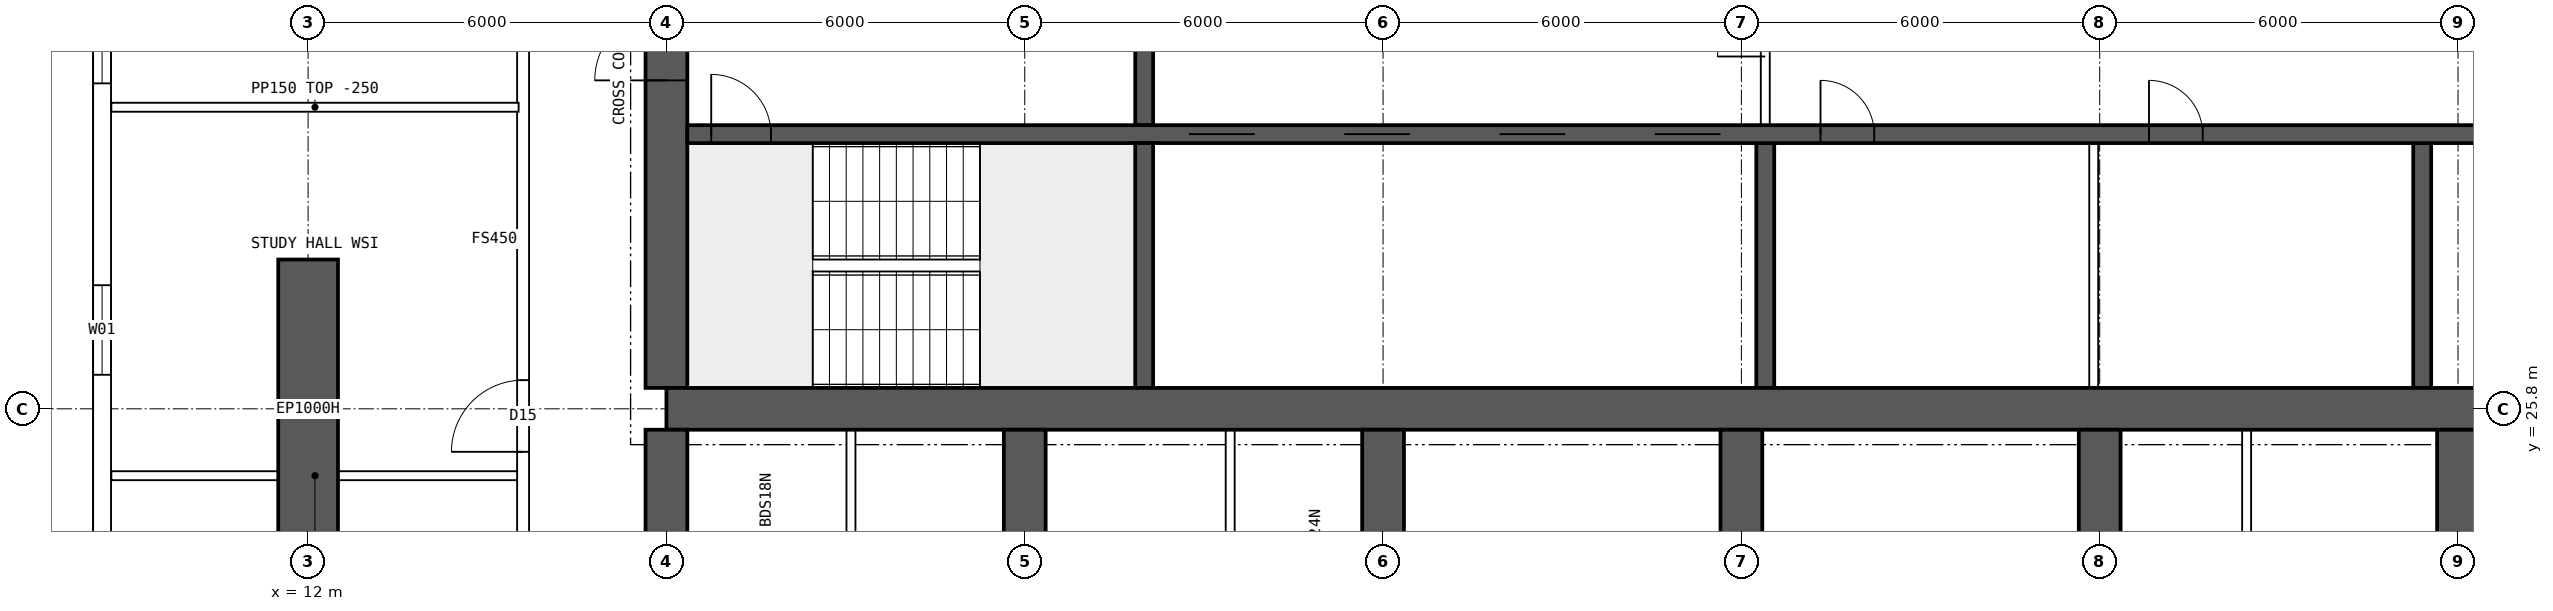
"""IFC4 building model, lengths in metres.
Left out: names, types, materials, properties, quantities, classifications, styles, units other than length and angle.
Written with IfcOpenShell. Run it as: python <this file> out.ifc"""

import sys

from ifc_helpers import new_model, si_unit, direction, frame, frame_2d, origin, place, context, subcontext, project, spatial, polyline, rectangle, outline, extrude, element, fill, save


model = new_model("IFC4")
c1 = context("Model", 3, precision=1e-05, world=origin(), true_north=direction((0.0, 1.0)))
c2 = subcontext(c1, "Body", "Model", "MODEL_VIEW")
j1 = project(units=[si_unit("LENGTHUNIT", "METRE"), si_unit("PLANEANGLEUNIT", "RADIAN")], contexts=[c1])
p1 = place(None, origin())
s1 = spatial("IfcSite", under=j1, at=p1, CompositionType="ELEMENT")
p2 = place(p1, origin())
s2 = spatial("IfcBuilding", under=s1, at=p2, CompositionType="ELEMENT")
p3 = place(p2, frame((0.0, 0.0, 216.55)))
s3 = spatial("IfcBuildingStorey", under=s2, at=p3, CompositionType="ELEMENT", Elevation=216.55)
p4 = place(p3, frame((12.0, 23.3, 0.0), z_axis=(0.0, 0.0, 1.0), x_axis=(0.0, 1.0, 0.0)))
e1 = element("IfcWall", 1, at=p4, inside=s3, PredefinedType="SHEAR", context=c2, shape_type="SweptSolid", body=[
    extrude(rectangle(XDim=5.0, YDim=1.0, at=frame_2d((2.5, 0.0))), origin(), (0.0, 0.0, 1.0), 3.75),
])
p5 = place(p3, frame((18.0, 25.8, 0.0), z_axis=(0.0, 0.0, 1.0), x_axis=(1.0, 0.0, 0.0)))
e2 = element("IfcWall", 2, at=p5, inside=s3, PredefinedType="SHEAR", context=c2, shape_type="SweptSolid", body=[
    extrude(rectangle(XDim=48.0, YDim=0.7, at=frame_2d((24.0, 0.0))), origin(), (0.0, 0.0, 1.0), 3.75),
])
p6 = place(p3, frame((18.0, 26.15, 0.0), z_axis=(0.0, 0.0, 1.0), x_axis=(0.0, 1.0, 0.0)))
e3 = element("IfcWall", 3, at=p6, inside=s3, PredefinedType="SHEAR", context=c2, shape_type="SweptSolid", body=[
    extrude(rectangle(XDim=11.7, YDim=0.7, at=frame_2d((5.85, 0.0))), origin(), (0.0, 0.0, 1.0), 3.75),
])
p7 = place(p6, frame((5.15, 0.0, 0.0)))
e4 = element("IfcOpeningElement", 4, at=p7, cuts=e3, PredefinedType="OPENING", context=c2, shape_type="SweptSolid", body=[
    extrude(rectangle(XDim=1.2, YDim=2.1, at=frame_2d((0.6, 1.05))), frame((0.0, 0.36, 0.0), z_axis=(0.0, -1.0, 0.0), x_axis=(1.0, 0.0, 0.0)), (0.0, 0.0, 1.0), 0.72),
])
p8 = place(p3, frame((18.35, 30.4, 0.0), z_axis=(0.0, 0.0, 1.0), x_axis=(1.0, 0.0, 0.0)))
e5 = element("IfcWall", 5, at=p8, inside=s3, PredefinedType="SHEAR", context=c2, shape_type="SweptSolid", body=[
    extrude(rectangle(XDim=47.3, YDim=0.3, at=frame_2d((23.65, 0.0))), origin(), (0.0, 0.0, 1.0), 3.75),
])
p9 = place(p8, frame((0.4, 0.0, 0.0)))
e6 = element("IfcOpeningElement", 6, at=p9, cuts=e5, PredefinedType="OPENING", context=c2, shape_type="SweptSolid", body=[
    extrude(rectangle(XDim=1.0, YDim=2.1, at=frame_2d((0.5, 1.05))), frame((0.0, 0.16, 0.0), z_axis=(0.0, -1.0, 0.0), x_axis=(1.0, 0.0, 0.0)), (0.0, 0.0, 1.0), 0.32),
])
p10 = place(p8, frame((45.9, 0.0, 0.0)))
e7 = element("IfcOpeningElement", 7, at=p10, cuts=e5, PredefinedType="OPENING", context=c2, shape_type="SweptSolid", body=[
    extrude(rectangle(XDim=1.0, YDim=2.1, at=frame_2d((0.5, 1.05))), frame((0.0, 0.16, 0.0), z_axis=(0.0, -1.0, 0.0), x_axis=(1.0, 0.0, 0.0)), (0.0, 0.0, 1.0), 0.32),
])
p11 = place(p8, frame((8.4, 0.0, 0.0)))
e8 = element("IfcOpeningElement", 8, at=p11, cuts=e5, PredefinedType="OPENING", context=c2, shape_type="SweptSolid", body=[
    extrude(rectangle(XDim=1.1, YDim=2.1, at=frame_2d((0.55, 1.05))), frame((0.0, 0.16, 0.0), z_axis=(0.0, -1.0, 0.0), x_axis=(1.0, 0.0, 0.0)), (0.0, 0.0, 1.0), 0.32),
])
p12 = place(p8, frame((11.0, 0.0, 0.0)))
e9 = element("IfcOpeningElement", 9, at=p12, cuts=e5, PredefinedType="OPENING", context=c2, shape_type="SweptSolid", body=[
    extrude(rectangle(XDim=1.1, YDim=2.1, at=frame_2d((0.55, 1.05))), frame((0.0, 0.16, 0.0), z_axis=(0.0, -1.0, 0.0), x_axis=(1.0, 0.0, 0.0)), (0.0, 0.0, 1.0), 0.32),
])
p13 = place(p8, frame((13.6, 0.0, 0.0)))
e10 = element("IfcOpeningElement", 10, at=p13, cuts=e5, PredefinedType="OPENING", context=c2, shape_type="SweptSolid", body=[
    extrude(rectangle(XDim=1.1, YDim=2.1, at=frame_2d((0.55, 1.05))), frame((0.0, 0.16, 0.0), z_axis=(0.0, -1.0, 0.0), x_axis=(1.0, 0.0, 0.0)), (0.0, 0.0, 1.0), 0.32),
])
p14 = place(p8, frame((16.2, 0.0, 0.0)))
e11 = element("IfcOpeningElement", 11, at=p14, cuts=e5, PredefinedType="OPENING", context=c2, shape_type="SweptSolid", body=[
    extrude(rectangle(XDim=1.1, YDim=2.1, at=frame_2d((0.55, 1.05))), frame((0.0, 0.16, 0.0), z_axis=(0.0, -1.0, 0.0), x_axis=(1.0, 0.0, 0.0)), (0.0, 0.0, 1.0), 0.32),
])
p15 = place(p8, frame((18.975, 0.0, 0.0)))
e12 = element("IfcOpeningElement", 12, at=p15, cuts=e5, PredefinedType="OPENING", context=c2, shape_type="SweptSolid", body=[
    extrude(rectangle(XDim=0.9, YDim=2.1, at=frame_2d((0.45, 1.05))), frame((0.0, 0.16, 0.0), z_axis=(0.0, -1.0, 0.0), x_axis=(1.0, 0.0, 0.0)), (0.0, 0.0, 1.0), 0.32),
])
p16 = place(p8, frame((24.475, 0.0, 0.0)))
e13 = element("IfcOpeningElement", 13, at=p16, cuts=e5, PredefinedType="OPENING", context=c2, shape_type="SweptSolid", body=[
    extrude(rectangle(XDim=0.9, YDim=2.1, at=frame_2d((0.45, 1.05))), frame((0.0, 0.16, 0.0), z_axis=(0.0, -1.0, 0.0), x_axis=(1.0, 0.0, 0.0)), (0.0, 0.0, 1.0), 0.32),
])
p17 = place(p8, frame((30.267, 0.0, 0.0)))
e14 = element("IfcOpeningElement", 14, at=p17, cuts=e5, PredefinedType="OPENING", context=c2, shape_type="SweptSolid", body=[
    extrude(rectangle(XDim=1.1, YDim=2.1, at=frame_2d((0.55, 1.05))), frame((0.0, 0.16, 0.0), z_axis=(0.0, -1.0, 0.0), x_axis=(1.0, 0.0, 0.0)), (0.0, 0.0, 1.0), 0.32),
])
p18 = place(p8, frame((33.8, 0.0, 0.0)))
e15 = element("IfcOpeningElement", 15, at=p18, cuts=e5, PredefinedType="OPENING", context=c2, shape_type="SweptSolid", body=[
    extrude(rectangle(XDim=1.1, YDim=2.1, at=frame_2d((0.55, 1.05))), frame((0.0, 0.16, 0.0), z_axis=(0.0, -1.0, 0.0), x_axis=(1.0, 0.0, 0.0)), (0.0, 0.0, 1.0), 0.32),
])
p19 = place(p8, frame((37.333, 0.0, 0.0)))
e16 = element("IfcOpeningElement", 16, at=p19, cuts=e5, PredefinedType="OPENING", context=c2, shape_type="SweptSolid", body=[
    extrude(rectangle(XDim=1.1, YDim=2.1, at=frame_2d((0.55, 1.05))), frame((0.0, 0.16, 0.0), z_axis=(0.0, -1.0, 0.0), x_axis=(1.0, 0.0, 0.0)), (0.0, 0.0, 1.0), 0.32),
])
p20 = place(p3, frame((26.0, 26.15, 0.0), z_axis=(0.0, 0.0, 1.0), x_axis=(0.0, 1.0, 0.0)))
e17 = element("IfcWall", 17, at=p20, inside=s3, PredefinedType="SHEAR", context=c2, shape_type="SweptSolid", body=[
    extrude(rectangle(XDim=4.1, YDim=0.3, at=frame_2d((2.05, 0.0))), origin(), (0.0, 0.0, 1.0), 3.75),
])
p21 = place(p3, frame((26.0, 30.55, 0.0), z_axis=(0.0, 0.0, 1.0), x_axis=(0.0, 1.0, 0.0)))
e18 = element("IfcWall", 18, at=p21, inside=s3, PredefinedType="SHEAR", context=c2, shape_type="SweptSolid", body=[
    extrude(rectangle(XDim=3.9, YDim=0.3, at=frame_2d((1.95, 0.0))), origin(), (0.0, 0.0, 1.0), 3.75),
])
p22 = place(p21, frame((1.4, 0.0, 0.0)))
e19 = element("IfcOpeningElement", 19, at=p22, cuts=e18, PredefinedType="OPENING", context=c2, shape_type="SweptSolid", body=[
    extrude(rectangle(XDim=1.2, YDim=2.1, at=frame_2d((0.6, 1.05))), frame((0.0, 0.16, 0.0), z_axis=(0.0, -1.0, 0.0), x_axis=(1.0, 0.0, 0.0)), (0.0, 0.0, 1.0), 0.32),
])
for number, where, z_axis, x_axis in (
    (20, (36.4, 26.15, 0.0), (0.0, 0.0, 1.0), (0.0, 1.0, 0.0)),
    (21, (47.4, 26.15, 0.0), (0.0, 0.0, 1.0), (0.0, 1.0, 0.0)),
):
    element("IfcWall", number, at=place(p3, frame(where, z_axis=z_axis, x_axis=x_axis)), inside=s3, PredefinedType="SHEAR", context=c2, shape_type="SweptSolid", body=[
        extrude(rectangle(XDim=4.1, YDim=0.3, at=frame_2d((2.05, 0.0))), origin(), (0.0, 0.0, 1.0), 3.75),
    ])
for number, where, z_axis, x_axis in (
    (22, (18.0, 18.4, 0.0), (0.0, 0.0, 1.0), (0.0, 1.0, 0.0)),
    (23, (24.0, 18.4, 0.0), (0.0, 0.0, 1.0), (0.0, 1.0, 0.0)),
    (24, (30.0, 18.4, 0.0), (0.0, 0.0, 1.0), (0.0, 1.0, 0.0)),
    (25, (36.0, 18.4, 0.0), (0.0, 0.0, 1.0), (0.0, 1.0, 0.0)),
    (26, (42.0, 18.4, 0.0), (0.0, 0.0, 1.0), (0.0, 1.0, 0.0)),
    (27, (48.0, 18.4, 0.0), (0.0, 0.0, 1.0), (0.0, 1.0, 0.0)),
):
    element("IfcWall", number, at=place(p3, frame(where, z_axis=z_axis, x_axis=x_axis)), inside=s3, PredefinedType="SHEAR", context=c2, shape_type="SweptSolid", body=[
        extrude(rectangle(XDim=7.05, YDim=0.7, at=frame_2d((3.525, 0.0))), origin(), (0.0, 0.0, 1.0), 3.75),
    ])
p23 = place(p3, frame((8.55, 44.2, 0.0), z_axis=(0.0, 0.0, 1.0), x_axis=(0.0, -1.0, 0.0)))
e28 = element("IfcWall", 28, at=p23, inside=s3, PredefinedType="SOLIDWALL", context=c2, shape_type="SweptSolid", body=[
    extrude(outline(polyline([(-0.015, -0.15), (24.415, -0.15), (24.385, 0.15), (0.015, 0.15), (-0.015, -0.15)])), origin(), (0.0, 0.0, 1.0), 3.5),
])
p24 = place(p23, frame((1.69, 0.0, 0.9)))
e29 = element("IfcOpeningElement", 29, at=p24, cuts=e28, PredefinedType="OPENING", context=c2, shape_type="SweptSolid", body=[
    extrude(rectangle(XDim=1.5, YDim=2.0, at=frame_2d((0.75, 1.0))), frame((0.0, 0.16, 0.0), z_axis=(0.0, -1.0, 0.0), x_axis=(1.0, 0.0, 0.0)), (0.0, 0.0, 1.0), 0.32),
])
p25 = place(p23, frame((6.57, 0.0, 0.9)))
e30 = element("IfcOpeningElement", 30, at=p25, cuts=e28, PredefinedType="OPENING", context=c2, shape_type="SweptSolid", body=[
    extrude(rectangle(XDim=1.5, YDim=2.0, at=frame_2d((0.75, 1.0))), frame((0.0, 0.16, 0.0), z_axis=(0.0, -1.0, 0.0), x_axis=(1.0, 0.0, 0.0)), (0.0, 0.0, 1.0), 0.32),
])
p26 = place(p23, frame((11.45, 0.0, 0.9)))
e31 = element("IfcOpeningElement", 31, at=p26, cuts=e28, PredefinedType="OPENING", context=c2, shape_type="SweptSolid", body=[
    extrude(rectangle(XDim=1.5, YDim=2.0, at=frame_2d((0.75, 1.0))), frame((0.0, 0.16, 0.0), z_axis=(0.0, -1.0, 0.0), x_axis=(1.0, 0.0, 0.0)), (0.0, 0.0, 1.0), 0.32),
])
p27 = place(p23, frame((16.33, 0.0, 0.9)))
e32 = element("IfcOpeningElement", 32, at=p27, cuts=e28, PredefinedType="OPENING", context=c2, shape_type="SweptSolid", body=[
    extrude(rectangle(XDim=1.5, YDim=2.0, at=frame_2d((0.75, 1.0))), frame((0.0, 0.16, 0.0), z_axis=(0.0, -1.0, 0.0), x_axis=(1.0, 0.0, 0.0)), (0.0, 0.0, 1.0), 0.32),
])
p28 = place(p23, frame((21.21, 0.0, 0.9)))
e33 = element("IfcOpeningElement", 33, at=p28, cuts=e28, PredefinedType="OPENING", context=c2, shape_type="SweptSolid", body=[
    extrude(rectangle(XDim=1.5, YDim=2.0, at=frame_2d((0.75, 1.0))), frame((0.0, 0.16, 0.0), z_axis=(0.0, -1.0, 0.0), x_axis=(1.0, 0.0, 0.0)), (0.0, 0.0, 1.0), 0.32),
])
p29 = place(p3, frame((36.4, 30.55, 0.0), z_axis=(0.0, 0.0, 1.0), x_axis=(0.0, 1.0, 0.0)))
e34 = element("IfcWall", 34, at=p29, inside=s3, PredefinedType="SOLIDWALL", context=c2, shape_type="SweptSolid", body=[
    extrude(rectangle(XDim=3.9, YDim=0.15, at=frame_2d((1.95, 0.0))), origin(), (0.0, 0.0, 1.0), 3.5),
])
p30 = place(p29, frame((1.15, 0.0, 0.0)))
e35 = element("IfcOpeningElement", 35, at=p30, cuts=e34, PredefinedType="OPENING", context=c2, shape_type="SweptSolid", body=[
    extrude(rectangle(XDim=1.6, YDim=2.1, at=frame_2d((0.8, 1.05))), frame((0.0, 0.085, 0.0), z_axis=(0.0, -1.0, 0.0), x_axis=(1.0, 0.0, 0.0)), (0.0, 0.0, 1.0), 0.17),
])
p31 = place(p3, frame((41.9, 26.15, 0.0), z_axis=(0.0, 0.0, 1.0), x_axis=(0.0, 1.0, 0.0)))
e36 = element("IfcWall", 36, at=p31, inside=s3, PredefinedType="SOLIDWALL", context=c2, shape_type="SweptSolid", body=[
    extrude(rectangle(XDim=4.1, YDim=0.15, at=frame_2d((2.05, 0.0))), origin(), (0.0, 0.0, 1.0), 3.5),
])
for number, where, z_axis, x_axis in (
    (37, (21.09, 18.5, 0.0), (0.0, 0.0, 1.0), (0.0, 1.0, 0.0)),
    (38, (27.44, 18.5, 0.0), (0.0, 0.0, 1.0), (0.0, 1.0, 0.0)),
    (39, (44.46, 18.5, 0.0), (0.0, 0.0, 1.0), (0.0, 1.0, 0.0)),
):
    element("IfcWall", number, at=place(p3, frame(where, z_axis=z_axis, x_axis=x_axis)), inside=s3, PredefinedType="PARTITIONING", context=c2, shape_type="SweptSolid", body=[
        extrude(rectangle(XDim=6.95, YDim=0.15, at=frame_2d((3.475, 0.0))), origin(), (0.0, 0.0, 1.0), 3.5),
    ])
p32 = place(p3, frame((8.705, 30.85, 0.0), z_axis=(0.0, 0.0, 1.0), x_axis=(1.0, 0.0, 0.0)))
e40 = element("IfcWall", 40, at=p32, inside=s3, PredefinedType="PARTITIONING", context=c2, shape_type="SweptSolid", body=[
    extrude(outline(polyline([(0.0, 0.0), (6.82, 0.0), (6.82, 3.5), (3.597, 3.5), (3.595, 3.05), (2.997, 3.05), (2.995, 3.5), (0.0, 3.5), (0.0, 0.0)])), frame((0.0, 0.075, 0.0), z_axis=(0.0, -1.0, 0.0), x_axis=(1.0, 0.0, 0.0)), (0.0, 0.0, 1.0), 0.15),
])
p33 = place(p3, frame((15.6, 11.646, 0.0), z_axis=(0.0, 0.0, 1.0), x_axis=(0.0, 1.0, 0.0)))
e41 = element("IfcWall", 41, at=p33, inside=s3, PredefinedType="SOLIDWALL", context=c2, shape_type="SweptSolid", body=[
    extrude(rectangle(XDim=40.708, YDim=0.2, at=frame_2d((20.354, 0.0))), origin(), (0.0, 0.0, 1.0), 3.5),
])
p34 = place(p33, frame((13.434, 0.0, 0.0)))
e42 = element("IfcOpeningElement", 42, at=p34, cuts=e41, PredefinedType="OPENING", context=c2, shape_type="SweptSolid", body=[
    extrude(rectangle(XDim=1.2, YDim=2.1, at=frame_2d((0.6, 1.05))), frame((0.0, 0.11, 0.0), z_axis=(0.0, -1.0, 0.0), x_axis=(1.0, 0.0, 0.0)), (0.0, 0.0, 1.0), 0.22),
])
p35 = place(p33, frame((5.104, 0.0, 0.0)))
e43 = element("IfcOpeningElement", 43, at=p35, cuts=e41, PredefinedType="OPENING", context=c2, shape_type="SweptSolid", body=[
    extrude(rectangle(XDim=1.4, YDim=2.1, at=frame_2d((0.7, 1.05))), frame((0.0, 0.11, 0.0), z_axis=(0.0, -1.0, 0.0), x_axis=(1.0, 0.0, 0.0)), (0.0, 0.0, 1.0), 0.22),
])
p36 = place(p33, frame((34.104, 0.0, 0.0)))
e44 = element("IfcOpeningElement", 44, at=p36, cuts=e41, PredefinedType="OPENING", context=c2, shape_type="SweptSolid", body=[
    extrude(rectangle(XDim=1.4, YDim=2.1, at=frame_2d((0.7, 1.05))), frame((0.0, 0.11, 0.0), z_axis=(0.0, -1.0, 0.0), x_axis=(1.0, 0.0, 0.0)), (0.0, 0.0, 1.0), 0.22),
])
p37 = place(p3, frame((8.705, 24.68, 0.0), z_axis=(0.0, 0.0, 1.0), x_axis=(1.0, 0.0, 0.0)))
e45 = element("IfcWall", 45, at=p37, inside=s3, PredefinedType="PARTITIONING", context=c2, shape_type="SweptSolid", body=[
    extrude(rectangle(XDim=6.82, YDim=0.15, at=frame_2d((3.41, 0.0))), origin(), (0.0, 0.0, 1.0), 3.5),
])
p38 = place(p26, origin())
e46 = element("IfcWindow", 46, at=p38, inside=s3, PartitioningType="SINGLE_PANEL", PredefinedType="WINDOW", context=c2, shape_type="SweptSolid", body=[
    extrude(rectangle(XDim=1.5, YDim=2.0, at=frame_2d((0.75, 1.0))), frame((0.0, 0.03, 0.0), z_axis=(0.0, -1.0, 0.0), x_axis=(1.0, 0.0, 0.0)), (0.0, 0.0, 1.0), 0.06),
])
fill(e31, e46)
p39 = place(p27, origin())
e47 = element("IfcWindow", 47, at=p39, inside=s3, PartitioningType="SINGLE_PANEL", PredefinedType="WINDOW", context=c2, shape_type="SweptSolid", body=[
    extrude(rectangle(XDim=1.5, YDim=2.0, at=frame_2d((0.75, 1.0))), frame((0.0, 0.03, 0.0), z_axis=(0.0, -1.0, 0.0), x_axis=(1.0, 0.0, 0.0)), (0.0, 0.0, 1.0), 0.06),
])
fill(e32, e47)
p40 = place(p30, origin())
e48 = element("IfcDoor", 48, at=p40, inside=s3, OperationType="DOUBLE_DOOR_SINGLE_SWING", PredefinedType="DOOR", context=c2, shape_type="SweptSolid", body=[
    extrude(rectangle(XDim=1.6, YDim=2.1, at=frame_2d((0.8, 1.05))), frame((0.0, 0.025, 0.0), z_axis=(0.0, -1.0, 0.0), x_axis=(1.0, 0.0, 0.0)), (0.0, 0.0, 1.0), 0.05),
])
fill(e35, e48)
p41 = place(p7, origin())
e49 = element("IfcDoor", 49, at=p41, inside=s3, OperationType="SINGLE_SWING_LEFT", PredefinedType="DOOR", context=c2, shape_type="SweptSolid", body=[
    extrude(rectangle(XDim=1.2, YDim=2.1, at=frame_2d((0.6, 1.05))), frame((0.0, 0.025, 0.0), z_axis=(0.0, -1.0, 0.0), x_axis=(1.0, 0.0, 0.0)), (0.0, 0.0, 1.0), 0.05),
])
fill(e4, e49)
p42 = place(p9, origin())
e50 = element("IfcDoor", 50, at=p42, inside=s3, OperationType="SINGLE_SWING_LEFT", PredefinedType="DOOR", context=c2, shape_type="SweptSolid", body=[
    extrude(rectangle(XDim=1.0, YDim=2.1, at=frame_2d((0.5, 1.05))), frame((0.0, 0.025, 0.0), z_axis=(0.0, -1.0, 0.0), x_axis=(1.0, 0.0, 0.0)), (0.0, 0.0, 1.0), 0.05),
])
fill(e6, e50)
p43 = place(p11, origin())
e51 = element("IfcDoor", 51, at=p43, inside=s3, OperationType="DOUBLE_DOOR_SLIDING", PredefinedType="DOOR", context=c2, shape_type="SweptSolid", body=[
    extrude(rectangle(XDim=1.1, YDim=2.1, at=frame_2d((0.55, 1.05))), frame((0.0, 0.025, 0.0), z_axis=(0.0, -1.0, 0.0), x_axis=(1.0, 0.0, 0.0)), (0.0, 0.0, 1.0), 0.05),
])
fill(e8, e51)
p44 = place(p12, origin())
e52 = element("IfcDoor", 52, at=p44, inside=s3, OperationType="DOUBLE_DOOR_SLIDING", PredefinedType="DOOR", context=c2, shape_type="SweptSolid", body=[
    extrude(rectangle(XDim=1.1, YDim=2.1, at=frame_2d((0.55, 1.05))), frame((0.0, 0.025, 0.0), z_axis=(0.0, -1.0, 0.0), x_axis=(1.0, 0.0, 0.0)), (0.0, 0.0, 1.0), 0.05),
])
fill(e9, e52)
p45 = place(p13, origin())
e53 = element("IfcDoor", 53, at=p45, inside=s3, OperationType="DOUBLE_DOOR_SLIDING", PredefinedType="DOOR", context=c2, shape_type="SweptSolid", body=[
    extrude(rectangle(XDim=1.1, YDim=2.1, at=frame_2d((0.55, 1.05))), frame((0.0, 0.025, 0.0), z_axis=(0.0, -1.0, 0.0), x_axis=(1.0, 0.0, 0.0)), (0.0, 0.0, 1.0), 0.05),
])
fill(e10, e53)
p46 = place(p14, origin())
e54 = element("IfcDoor", 54, at=p46, inside=s3, OperationType="DOUBLE_DOOR_SLIDING", PredefinedType="DOOR", context=c2, shape_type="SweptSolid", body=[
    extrude(rectangle(XDim=1.1, YDim=2.1, at=frame_2d((0.55, 1.05))), frame((0.0, 0.025, 0.0), z_axis=(0.0, -1.0, 0.0), x_axis=(1.0, 0.0, 0.0)), (0.0, 0.0, 1.0), 0.05),
])
fill(e11, e54)
p47 = place(p15, origin())
e55 = element("IfcDoor", 55, at=p47, inside=s3, OperationType="SINGLE_SWING_LEFT", PredefinedType="DOOR", context=c2, shape_type="SweptSolid", body=[
    extrude(rectangle(XDim=0.9, YDim=2.1, at=frame_2d((0.45, 1.05))), frame((0.0, 0.025, 0.0), z_axis=(0.0, -1.0, 0.0), x_axis=(1.0, 0.0, 0.0)), (0.0, 0.0, 1.0), 0.05),
])
fill(e12, e55)
p48 = place(p16, origin())
e56 = element("IfcDoor", 56, at=p48, inside=s3, OperationType="SINGLE_SWING_LEFT", PredefinedType="DOOR", context=c2, shape_type="SweptSolid", body=[
    extrude(rectangle(XDim=0.9, YDim=2.1, at=frame_2d((0.45, 1.05))), frame((0.0, 0.025, 0.0), z_axis=(0.0, -1.0, 0.0), x_axis=(1.0, 0.0, 0.0)), (0.0, 0.0, 1.0), 0.05),
])
fill(e13, e56)
p49 = place(p34, origin())
e57 = element("IfcDoor", 57, at=p49, inside=s3, OperationType="SINGLE_SWING_LEFT", PredefinedType="DOOR", context=c2, shape_type="SweptSolid", body=[
    extrude(rectangle(XDim=1.2, YDim=2.1, at=frame_2d((0.6, 1.05))), frame((0.0, 0.025, 0.0), z_axis=(0.0, -1.0, 0.0), x_axis=(1.0, 0.0, 0.0)), (0.0, 0.0, 1.0), 0.05),
])
fill(e42, e57)
save(model, sys.argv[1])
